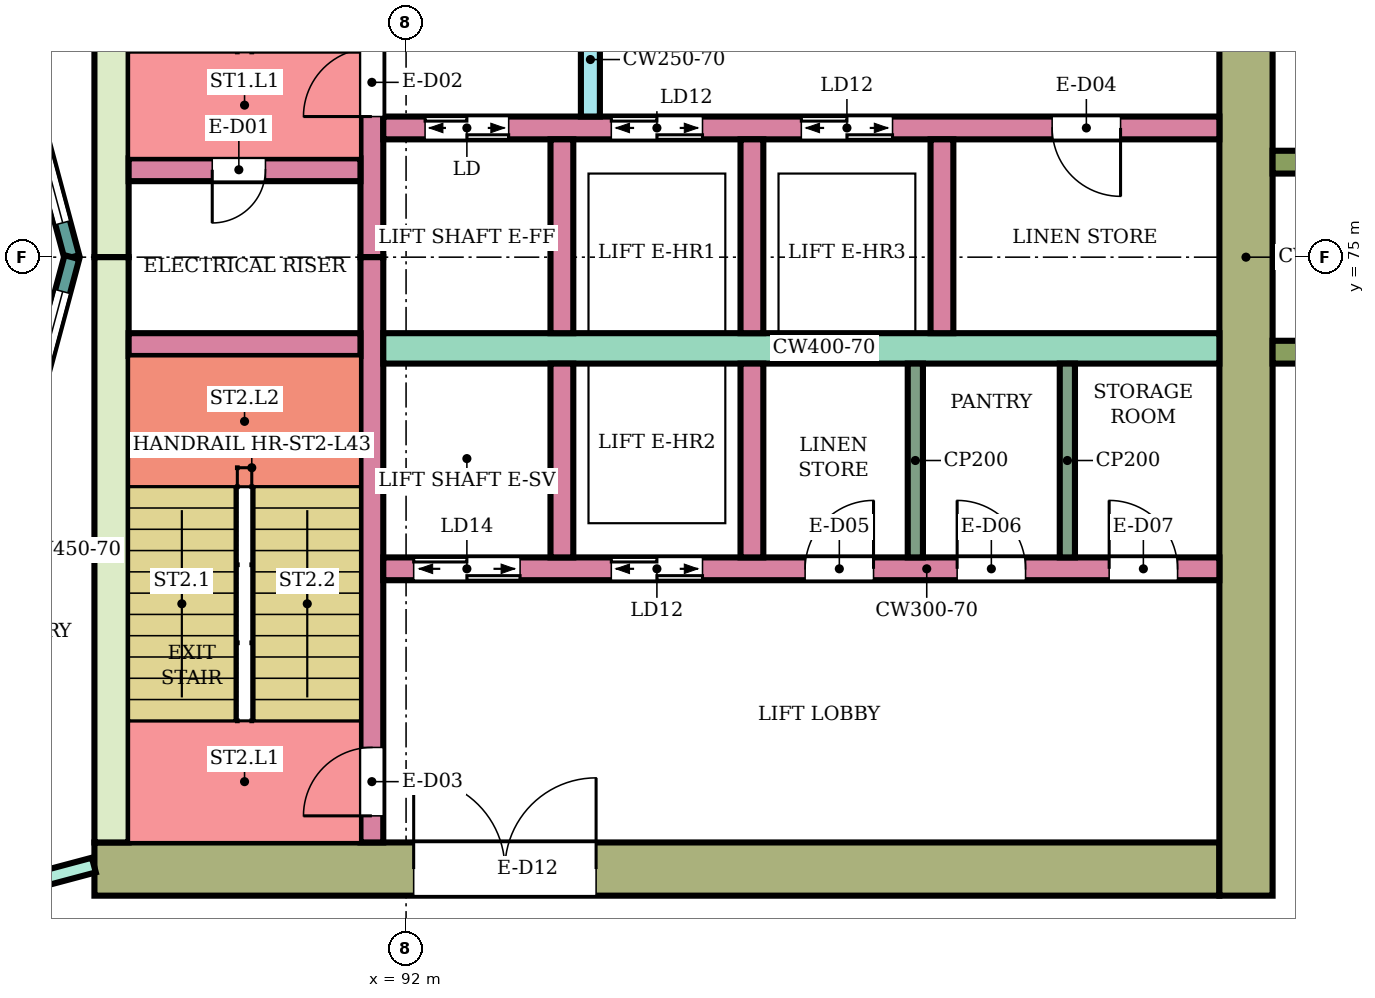
"""IFC4 building model, lengths in metres.
Left out: names, types, materials, properties, quantities, classifications, styles, units other than length and angle.
Written with IfcOpenShell. Run it as: python <this file> out.ifc"""

import sys

from ifc_helpers import new_model, si_unit, direction, frame, frame_2d, origin, place, context, subcontext, project, spatial, rectangle, extrude, element, fill, save


model = new_model("IFC4")
c1 = context("Model", 3, precision=1e-05, world=origin(), true_north=direction((0.0, 1.0)))
c2 = subcontext(c1, "Body", "Model", "MODEL_VIEW")
j1 = project(units=[si_unit("LENGTHUNIT", "METRE"), si_unit("PLANEANGLEUNIT", "RADIAN")], contexts=[c1])
p1 = place(None, origin())
s1 = spatial("IfcSite", under=j1, at=p1, CompositionType="ELEMENT")
p2 = place(p1, origin())
s2 = spatial("IfcBuilding", under=s1, at=p2, CompositionType="ELEMENT")
p3 = place(p2, frame((0.0, 0.0, 186.4)))
s3 = spatial("IfcBuildingStorey", under=s2, at=p3, CompositionType="ELEMENT", Elevation=186.4)
p4 = place(p3, frame((87.9, 66.95, 0.0), z_axis=(0.0, 0.0, 1.0), x_axis=(1.0, 0.0, 0.0)))
e1 = element("IfcWall", 1, at=p4, inside=s3, PredefinedType="SHEAR", context=c2, shape_type="SweptSolid", body=[
    extrude(rectangle(XDim=14.8, YDim=0.7, at=frame_2d((7.4, 0.0))), origin(), (0.0, 0.0, 1.0), 3.78),
])
p5 = place(p4, frame((4.2, 0.0, 0.0)))
e2 = element("IfcOpeningElement", 2, at=p5, cuts=e1, PredefinedType="OPENING", context=c2, shape_type="SweptSolid", body=[
    extrude(rectangle(XDim=2.4, YDim=2.4, at=frame_2d((1.2, 1.2))), frame((0.0, 0.36, 0.0), z_axis=(0.0, -1.0, 0.0), x_axis=(1.0, 0.0, 0.0)), (0.0, 0.0, 1.0), 0.72),
])
for number, where, z_axis, x_axis in (
    (3, (88.125, 75.0, 0.0), (0.0, 0.0, 1.0), (0.0, 1.0, 0.0)),
    (4, (88.125, 67.3, 0.0), (0.0, 0.0, 1.0), (0.0, 1.0, 0.0)),
):
    element("IfcWall", number, at=place(p3, frame(where, z_axis=z_axis, x_axis=x_axis)), inside=s3, PredefinedType="SHEAR", context=c2, shape_type="SweptSolid", body=[
        extrude(rectangle(XDim=7.7, YDim=0.45, at=frame_2d((3.85, 0.0))), origin(), (0.0, 0.0, 1.0), 3.78),
    ])
p6 = place(p3, frame((103.05, 66.6, 0.0), z_axis=(0.0, 0.0, 1.0), x_axis=(0.0, 1.0, 0.0)))
e5 = element("IfcWall", 5, at=p6, inside=s3, PredefinedType="SHEAR", context=c2, shape_type="SweptSolid", body=[
    extrude(rectangle(XDim=16.8, YDim=0.7, at=frame_2d((8.4, 0.0))), origin(), (0.0, 0.0, 1.0), 3.78),
])
p7 = place(p3, frame((91.55, 75.0, 0.0), z_axis=(0.0, 0.0, 1.0), x_axis=(0.0, 1.0, 0.0)))
e6 = element("IfcWall", 6, at=p7, inside=s3, PredefinedType="SHEAR", context=c2, shape_type="SweptSolid", body=[
    extrude(rectangle(XDim=7.7, YDim=0.3, at=frame_2d((3.85, 0.0))), origin(), (0.0, 0.0, 1.0), 3.78),
])
p8 = place(p7, frame((1.85, 0.0, 0.0)))
e7 = element("IfcOpeningElement", 7, at=p8, cuts=e6, PredefinedType="OPENING", context=c2, shape_type="SweptSolid", body=[
    extrude(rectangle(XDim=0.9, YDim=2.1, at=frame_2d((0.45, 1.05))), frame((0.0, 0.16, 0.0), z_axis=(0.0, -1.0, 0.0), x_axis=(1.0, 0.0, 0.0)), (0.0, 0.0, 1.0), 0.32),
])
p9 = place(p3, frame((91.55, 67.3, 0.0), z_axis=(0.0, 0.0, 1.0), x_axis=(0.0, 1.0, 0.0)))
e8 = element("IfcWall", 8, at=p9, inside=s3, PredefinedType="SHEAR", context=c2, shape_type="SweptSolid", body=[
    extrude(rectangle(XDim=7.7, YDim=0.3, at=frame_2d((3.85, 0.0))), origin(), (0.0, 0.0, 1.0), 3.78),
])
p10 = place(p9, frame((0.35, 0.0, 0.0)))
e9 = element("IfcOpeningElement", 9, at=p10, cuts=e8, PredefinedType="OPENING", context=c2, shape_type="SweptSolid", body=[
    extrude(rectangle(XDim=0.9, YDim=2.1, at=frame_2d((0.45, 1.05))), frame((0.0, 0.16, 0.0), z_axis=(0.0, -1.0, 0.0), x_axis=(1.0, 0.0, 0.0)), (0.0, 0.0, 1.0), 0.32),
])
p11 = place(p3, frame((88.35, 76.15, 0.0), z_axis=(0.0, 0.0, 1.0), x_axis=(1.0, 0.0, 0.0)))
e10 = element("IfcWall", 10, at=p11, inside=s3, PredefinedType="SHEAR", context=c2, shape_type="SweptSolid", body=[
    extrude(rectangle(XDim=3.05, YDim=0.3, at=frame_2d((1.525, 0.0))), origin(), (0.0, 0.0, 1.0), 3.78),
])
p12 = place(p11, frame((1.1, 0.0, 0.0)))
e11 = element("IfcOpeningElement", 11, at=p12, cuts=e10, PredefinedType="OPENING", context=c2, shape_type="SweptSolid", body=[
    extrude(rectangle(XDim=0.7, YDim=2.0, at=frame_2d((0.35, 1.0))), frame((0.0, 0.16, 0.0), z_axis=(0.0, -1.0, 0.0), x_axis=(1.0, 0.0, 0.0)), (0.0, 0.0, 1.0), 0.32),
])
p13 = place(p3, frame((88.35, 73.85, 0.0), z_axis=(0.0, 0.0, 1.0), x_axis=(1.0, 0.0, 0.0)))
e12 = element("IfcWall", 12, at=p13, inside=s3, PredefinedType="SHEAR", context=c2, shape_type="SweptSolid", body=[
    extrude(rectangle(XDim=3.05, YDim=0.3, at=frame_2d((1.525, 0.0))), origin(), (0.0, 0.0, 1.0), 3.78),
])
p14 = place(p3, frame((91.7, 76.7, 0.0), z_axis=(0.0, 0.0, 1.0), x_axis=(1.0, 0.0, 0.0)))
e13 = element("IfcWall", 13, at=p14, inside=s3, PredefinedType="SHEAR", context=c2, shape_type="SweptSolid", body=[
    extrude(rectangle(XDim=11.0, YDim=0.3, at=frame_2d((5.5, 0.0))), origin(), (0.0, 0.0, 1.0), 3.78),
])
p15 = place(p14, frame((0.55, 0.0, 0.0)))
e14 = element("IfcOpeningElement", 14, at=p15, cuts=e13, PredefinedType="OPENING", context=c2, shape_type="SweptSolid", body=[
    extrude(rectangle(XDim=1.1, YDim=2.1, at=frame_2d((0.55, 1.05))), frame((0.0, 0.16, 0.0), z_axis=(0.0, -1.0, 0.0), x_axis=(1.0, 0.0, 0.0)), (0.0, 0.0, 1.0), 0.32),
])
p16 = place(p14, frame((3.0, 0.0, 0.0)))
e15 = element("IfcOpeningElement", 15, at=p16, cuts=e13, PredefinedType="OPENING", context=c2, shape_type="SweptSolid", body=[
    extrude(rectangle(XDim=1.2, YDim=2.1, at=frame_2d((0.6, 1.05))), frame((0.0, 0.16, 0.0), z_axis=(0.0, -1.0, 0.0), x_axis=(1.0, 0.0, 0.0)), (0.0, 0.0, 1.0), 0.32),
])
p17 = place(p14, frame((5.5, 0.0, 0.0)))
e16 = element("IfcOpeningElement", 16, at=p17, cuts=e13, PredefinedType="OPENING", context=c2, shape_type="SweptSolid", body=[
    extrude(rectangle(XDim=1.2, YDim=2.1, at=frame_2d((0.6, 1.05))), frame((0.0, 0.16, 0.0), z_axis=(0.0, -1.0, 0.0), x_axis=(1.0, 0.0, 0.0)), (0.0, 0.0, 1.0), 0.32),
])
p18 = place(p14, frame((8.8, 0.0, 0.0)))
e17 = element("IfcOpeningElement", 17, at=p18, cuts=e13, PredefinedType="OPENING", context=c2, shape_type="SweptSolid", body=[
    extrude(rectangle(XDim=0.9, YDim=2.1, at=frame_2d((0.45, 1.05))), frame((0.0, 0.16, 0.0), z_axis=(0.0, -1.0, 0.0), x_axis=(1.0, 0.0, 0.0)), (0.0, 0.0, 1.0), 0.32),
])
p19 = place(p3, frame((91.7, 73.8, 0.0), z_axis=(0.0, 0.0, 1.0), x_axis=(1.0, 0.0, 0.0)))
e18 = element("IfcWall", 18, at=p19, inside=s3, PredefinedType="SHEAR", context=c2, shape_type="SweptSolid", body=[
    extrude(rectangle(XDim=11.0, YDim=0.4, at=frame_2d((5.5, 0.0))), origin(), (0.0, 0.0, 1.0), 3.78),
])
p20 = place(p3, frame((91.7, 70.9, 0.0), z_axis=(0.0, 0.0, 1.0), x_axis=(1.0, 0.0, 0.0)))
e19 = element("IfcWall", 19, at=p20, inside=s3, PredefinedType="SHEAR", context=c2, shape_type="SweptSolid", body=[
    extrude(rectangle(XDim=11.0, YDim=0.3, at=frame_2d((5.5, 0.0))), origin(), (0.0, 0.0, 1.0), 3.78),
])
p21 = place(p20, frame((0.4, 0.0, 0.0)))
e20 = element("IfcOpeningElement", 20, at=p21, cuts=e19, PredefinedType="OPENING", context=c2, shape_type="SweptSolid", body=[
    extrude(rectangle(XDim=1.4, YDim=2.1, at=frame_2d((0.7, 1.05))), frame((0.0, 0.16, 0.0), z_axis=(0.0, -1.0, 0.0), x_axis=(1.0, 0.0, 0.0)), (0.0, 0.0, 1.0), 0.32),
])
p22 = place(p20, frame((3.0, 0.0, 0.0)))
e21 = element("IfcOpeningElement", 21, at=p22, cuts=e19, PredefinedType="OPENING", context=c2, shape_type="SweptSolid", body=[
    extrude(rectangle(XDim=1.2, YDim=2.1, at=frame_2d((0.6, 1.05))), frame((0.0, 0.16, 0.0), z_axis=(0.0, -1.0, 0.0), x_axis=(1.0, 0.0, 0.0)), (0.0, 0.0, 1.0), 0.32),
])
p23 = place(p20, frame((5.55, 0.0, 0.0)))
e22 = element("IfcOpeningElement", 22, at=p23, cuts=e19, PredefinedType="OPENING", context=c2, shape_type="SweptSolid", body=[
    extrude(rectangle(XDim=0.9, YDim=2.1, at=frame_2d((0.45, 1.05))), frame((0.0, 0.16, 0.0), z_axis=(0.0, -1.0, 0.0), x_axis=(1.0, 0.0, 0.0)), (0.0, 0.0, 1.0), 0.32),
])
p24 = place(p20, frame((7.55, 0.0, 0.0)))
e23 = element("IfcOpeningElement", 23, at=p24, cuts=e19, PredefinedType="OPENING", context=c2, shape_type="SweptSolid", body=[
    extrude(rectangle(XDim=0.9, YDim=2.1, at=frame_2d((0.45, 1.05))), frame((0.0, 0.16, 0.0), z_axis=(0.0, -1.0, 0.0), x_axis=(1.0, 0.0, 0.0)), (0.0, 0.0, 1.0), 0.32),
])
p25 = place(p20, frame((9.55, 0.0, 0.0)))
e24 = element("IfcOpeningElement", 24, at=p25, cuts=e19, PredefinedType="OPENING", context=c2, shape_type="SweptSolid", body=[
    extrude(rectangle(XDim=0.9, YDim=2.1, at=frame_2d((0.45, 1.05))), frame((0.0, 0.16, 0.0), z_axis=(0.0, -1.0, 0.0), x_axis=(1.0, 0.0, 0.0)), (0.0, 0.0, 1.0), 0.32),
])
for number, where, z_axis, x_axis in (
    (25, (94.05, 74.0, 0.0), (0.0, 0.0, 1.0), (0.0, 1.0, 0.0)),
    (26, (96.55, 74.0, 0.0), (0.0, 0.0, 1.0), (0.0, 1.0, 0.0)),
    (27, (99.05, 74.0, 0.0), (0.0, 0.0, 1.0), (0.0, 1.0, 0.0)),
    (28, (94.05, 71.05, 0.0), (0.0, 0.0, 1.0), (0.0, 1.0, 0.0)),
    (29, (96.55, 71.05, 0.0), (0.0, 0.0, 1.0), (0.0, 1.0, 0.0)),
):
    element("IfcWall", number, at=place(p3, frame(where, z_axis=z_axis, x_axis=x_axis)), inside=s3, PredefinedType="SHEAR", context=c2, shape_type="SweptSolid", body=[
        extrude(rectangle(XDim=2.55, YDim=0.3, at=frame_2d((1.275, 0.0))), origin(), (0.0, 0.0, 1.0), 3.78),
    ])
p26 = place(p3, frame((94.425, 76.85, 0.0), z_axis=(0.0, 0.0, 1.0), x_axis=(0.0, 1.0, 0.0)))
e30 = element("IfcWall", 30, at=p26, inside=s3, PredefinedType="SHEAR", context=c2, shape_type="SweptSolid", body=[
    extrude(rectangle(XDim=1.5, YDim=0.25, at=frame_2d((0.75, 0.0))), origin(), (0.0, 0.0, 1.0), 3.78),
])
for number, where, z_axis, x_axis in (
    (31, (103.4, 73.75, 0.0), (0.0, 0.0, 1.0), (1.0, 0.0, 0.0)),
    (32, (103.4, 76.25, 0.0), (0.0, 0.0, 1.0), (1.0, 0.0, 0.0)),
):
    element("IfcWall", number, at=place(p3, frame(where, z_axis=z_axis, x_axis=x_axis)), inside=s3, PredefinedType="NOTDEFINED", context=c2, shape_type="SweptSolid", body=[
        extrude(rectangle(XDim=2.416, YDim=0.3, at=frame_2d((1.208, 0.0))), origin(), (0.0, 0.0, 1.0), 4.1),
    ])
p27 = place(p3, frame((87.604, 75.0, 0.0), z_axis=(0.0, 0.0, 1.0), x_axis=(-0.258789828301, 0.965933654434, 0.0)))
e33 = element("IfcWall", 33, at=p27, inside=s3, PredefinedType="NOTDEFINED", context=c2, shape_type="SweptSolid", body=[
    extrude(rectangle(XDim=3.936, YDim=0.2, at=frame_2d((1.968, 0.0))), origin(), (0.0, 0.0, 1.0), 4.1),
])
p28 = place(p27, frame((0.468, 0.0, 0.9)))
e34 = element("IfcOpeningElement", 34, at=p28, cuts=e33, PredefinedType="OPENING", context=c2, shape_type="SweptSolid", body=[
    extrude(rectangle(XDim=3.0, YDim=2.3, at=frame_2d((1.5, 1.15))), frame((0.0, 0.11, 0.0), z_axis=(0.0, -1.0, 0.0), x_axis=(1.0, 0.0, 0.0)), (0.0, 0.0, 1.0), 0.22),
])
p29 = place(p3, frame((86.585, 71.198, 0.0), z_axis=(0.0, 0.0, 1.0), x_axis=(0.258789828301, 0.965933654434, 0.0)))
e35 = element("IfcWall", 35, at=p29, inside=s3, PredefinedType="NOTDEFINED", context=c2, shape_type="SweptSolid", body=[
    extrude(rectangle(XDim=3.936, YDim=0.2, at=frame_2d((1.968, 0.0))), origin(), (0.0, 0.0, 1.0), 4.1),
])
p30 = place(p29, frame((0.468, 0.0, 0.9)))
e36 = element("IfcOpeningElement", 36, at=p30, cuts=e35, PredefinedType="OPENING", context=c2, shape_type="SweptSolid", body=[
    extrude(rectangle(XDim=3.0, YDim=2.3, at=frame_2d((1.5, 1.15))), frame((0.0, 0.11, 0.0), z_axis=(0.0, -1.0, 0.0), x_axis=(1.0, 0.0, 0.0)), (0.0, 0.0, 1.0), 0.22),
])
p31 = place(p3, frame((80.125, 64.932, 0.0), z_axis=(0.0, 0.0, 1.0), x_axis=(0.966236955806, 0.257655089674, 0.0)))
e37 = element("IfcWall", 37, at=p31, inside=s3, PredefinedType="PARTITIONING", context=c2, shape_type="SweptSolid", body=[
    extrude(rectangle(XDim=8.039, YDim=0.2, at=frame_2d((4.02, 0.0))), origin(), (0.0, 0.0, 1.0), 3.65),
])
p32 = place(p31, frame((6.298, 0.0, 0.0)))
e38 = element("IfcOpeningElement", 38, at=p32, cuts=e37, PredefinedType="OPENING", context=c2, shape_type="SweptSolid", body=[
    extrude(rectangle(XDim=0.9, YDim=2.1, at=frame_2d((0.45, 1.05))), frame((0.0, 0.11, 0.0), z_axis=(0.0, -1.0, 0.0), x_axis=(1.0, 0.0, 0.0)), (0.0, 0.0, 1.0), 0.22),
])
p33 = place(p31, frame((2.045, 0.0, 0.0)))
e39 = element("IfcOpeningElement", 39, at=p33, cuts=e37, PredefinedType="OPENING", context=c2, shape_type="SweptSolid", body=[
    extrude(rectangle(XDim=0.9, YDim=2.1, at=frame_2d((0.45, 1.05))), frame((0.0, 0.11, 0.0), z_axis=(0.0, -1.0, 0.0), x_axis=(1.0, 0.0, 0.0)), (0.0, 0.0, 1.0), 0.22),
])
for number, where, z_axis, x_axis in (
    (40, (98.7, 71.05, 0.0), (0.0, 0.0, 1.0), (0.0, 1.0, 0.0)),
    (41, (100.7, 71.05, 0.0), (0.0, 0.0, 1.0), (0.0, 1.0, 0.0)),
):
    element("IfcWall", number, at=place(p3, frame(where, z_axis=z_axis, x_axis=x_axis)), inside=s3, PredefinedType="PARTITIONING", context=c2, shape_type="SweptSolid", body=[
        extrude(rectangle(XDim=2.55, YDim=0.2, at=frame_2d((1.275, 0.0))), origin(), (0.0, 0.0, 1.0), 3.78),
    ])
p34 = place(p28, origin())
e42 = element("IfcWindow", 42, at=p34, inside=s3, PartitioningType="SINGLE_PANEL", PredefinedType="WINDOW", context=c2, shape_type="SweptSolid", body=[
    extrude(rectangle(XDim=3.0, YDim=2.3, at=frame_2d((1.5, 1.15))), frame((0.0, 0.03, 0.0), z_axis=(0.0, -1.0, 0.0), x_axis=(1.0, 0.0, 0.0)), (0.0, 0.0, 1.0), 0.06),
])
fill(e34, e42)
p35 = place(p30, origin())
e43 = element("IfcWindow", 43, at=p35, inside=s3, PartitioningType="SINGLE_PANEL", PredefinedType="WINDOW", context=c2, shape_type="SweptSolid", body=[
    extrude(rectangle(XDim=3.0, YDim=2.3, at=frame_2d((1.5, 1.15))), frame((0.0, 0.03, 0.0), z_axis=(0.0, -1.0, 0.0), x_axis=(1.0, 0.0, 0.0)), (0.0, 0.0, 1.0), 0.06),
])
fill(e36, e43)
p36 = place(p12, frame((0.7, 0.0, 0.0), z_axis=(0.0, 0.0, 1.0), x_axis=(-1.0, 0.0, 0.0)))
e44 = element("IfcDoor", 44, at=p36, inside=s3, OperationType="SINGLE_SWING_RIGHT", PredefinedType="DOOR", context=c2, shape_type="SweptSolid", body=[
    extrude(rectangle(XDim=0.7, YDim=2.0, at=frame_2d((0.35, 1.0))), frame((0.0, 0.025, 0.0), z_axis=(0.0, -1.0, 0.0), x_axis=(1.0, 0.0, 0.0)), (0.0, 0.0, 1.0), 0.05),
])
fill(e11, e44)
p37 = place(p8, origin())
e45 = element("IfcDoor", 45, at=p37, inside=s3, OperationType="SINGLE_SWING_LEFT", PredefinedType="DOOR", context=c2, shape_type="SweptSolid", body=[
    extrude(rectangle(XDim=0.9, YDim=2.1, at=frame_2d((0.45, 1.05))), frame((0.0, 0.025, 0.0), z_axis=(0.0, -1.0, 0.0), x_axis=(1.0, 0.0, 0.0)), (0.0, 0.0, 1.0), 0.05),
])
fill(e7, e45)
p38 = place(p10, origin())
e46 = element("IfcDoor", 46, at=p38, inside=s3, OperationType="SINGLE_SWING_LEFT", PredefinedType="DOOR", context=c2, shape_type="SweptSolid", body=[
    extrude(rectangle(XDim=0.9, YDim=2.1, at=frame_2d((0.45, 1.05))), frame((0.0, 0.025, 0.0), z_axis=(0.0, -1.0, 0.0), x_axis=(1.0, 0.0, 0.0)), (0.0, 0.0, 1.0), 0.05),
])
fill(e9, e46)
p39 = place(p15, origin())
e47 = element("IfcDoor", 47, at=p39, inside=s3, OperationType="DOUBLE_DOOR_SLIDING", PredefinedType="DOOR", context=c2, shape_type="SweptSolid", body=[
    extrude(rectangle(XDim=1.1, YDim=2.1, at=frame_2d((0.55, 1.05))), frame((0.0, 0.025, 0.0), z_axis=(0.0, -1.0, 0.0), x_axis=(1.0, 0.0, 0.0)), (0.0, 0.0, 1.0), 0.05),
])
fill(e14, e47)
p40 = place(p16, origin())
e48 = element("IfcDoor", 48, at=p40, inside=s3, OperationType="DOUBLE_DOOR_SLIDING", PredefinedType="DOOR", context=c2, shape_type="SweptSolid", body=[
    extrude(rectangle(XDim=1.2, YDim=2.1, at=frame_2d((0.6, 1.05))), frame((0.0, 0.025, 0.0), z_axis=(0.0, -1.0, 0.0), x_axis=(1.0, 0.0, 0.0)), (0.0, 0.0, 1.0), 0.05),
])
fill(e15, e48)
p41 = place(p17, origin())
e49 = element("IfcDoor", 49, at=p41, inside=s3, OperationType="DOUBLE_DOOR_SLIDING", PredefinedType="DOOR", context=c2, shape_type="SweptSolid", body=[
    extrude(rectangle(XDim=1.2, YDim=2.1, at=frame_2d((0.6, 1.05))), frame((0.0, 0.025, 0.0), z_axis=(0.0, -1.0, 0.0), x_axis=(1.0, 0.0, 0.0)), (0.0, 0.0, 1.0), 0.05),
])
fill(e16, e49)
p42 = place(p18, frame((0.9, 0.0, 0.0), z_axis=(0.0, 0.0, 1.0), x_axis=(-1.0, 0.0, 0.0)))
e50 = element("IfcDoor", 50, at=p42, inside=s3, OperationType="SINGLE_SWING_LEFT", PredefinedType="DOOR", context=c2, shape_type="SweptSolid", body=[
    extrude(rectangle(XDim=0.9, YDim=2.1, at=frame_2d((0.45, 1.05))), frame((0.0, 0.025, 0.0), z_axis=(0.0, -1.0, 0.0), x_axis=(1.0, 0.0, 0.0)), (0.0, 0.0, 1.0), 0.05),
])
fill(e17, e50)
p43 = place(p21, origin())
e51 = element("IfcDoor", 51, at=p43, inside=s3, OperationType="DOUBLE_DOOR_SLIDING", PredefinedType="DOOR", context=c2, shape_type="SweptSolid", body=[
    extrude(rectangle(XDim=1.4, YDim=2.1, at=frame_2d((0.7, 1.05))), frame((0.0, 0.025, 0.0), z_axis=(0.0, -1.0, 0.0), x_axis=(1.0, 0.0, 0.0)), (0.0, 0.0, 1.0), 0.05),
])
fill(e20, e51)
p44 = place(p22, origin())
e52 = element("IfcDoor", 52, at=p44, inside=s3, OperationType="DOUBLE_DOOR_SLIDING", PredefinedType="DOOR", context=c2, shape_type="SweptSolid", body=[
    extrude(rectangle(XDim=1.2, YDim=2.1, at=frame_2d((0.6, 1.05))), frame((0.0, 0.025, 0.0), z_axis=(0.0, -1.0, 0.0), x_axis=(1.0, 0.0, 0.0)), (0.0, 0.0, 1.0), 0.05),
])
fill(e21, e52)
p45 = place(p23, origin())
e53 = element("IfcDoor", 53, at=p45, inside=s3, OperationType="SINGLE_SWING_RIGHT", PredefinedType="DOOR", context=c2, shape_type="SweptSolid", body=[
    extrude(rectangle(XDim=0.9, YDim=2.1, at=frame_2d((0.45, 1.05))), frame((0.0, 0.025, 0.0), z_axis=(0.0, -1.0, 0.0), x_axis=(1.0, 0.0, 0.0)), (0.0, 0.0, 1.0), 0.05),
])
fill(e22, e53)
p46 = place(p24, origin())
e54 = element("IfcDoor", 54, at=p46, inside=s3, OperationType="SINGLE_SWING_LEFT", PredefinedType="DOOR", context=c2, shape_type="SweptSolid", body=[
    extrude(rectangle(XDim=0.9, YDim=2.1, at=frame_2d((0.45, 1.05))), frame((0.0, 0.025, 0.0), z_axis=(0.0, -1.0, 0.0), x_axis=(1.0, 0.0, 0.0)), (0.0, 0.0, 1.0), 0.05),
])
fill(e23, e54)
p47 = place(p25, origin())
e55 = element("IfcDoor", 55, at=p47, inside=s3, OperationType="SINGLE_SWING_LEFT", PredefinedType="DOOR", context=c2, shape_type="SweptSolid", body=[
    extrude(rectangle(XDim=0.9, YDim=2.1, at=frame_2d((0.45, 1.05))), frame((0.0, 0.025, 0.0), z_axis=(0.0, -1.0, 0.0), x_axis=(1.0, 0.0, 0.0)), (0.0, 0.0, 1.0), 0.05),
])
fill(e24, e55)
p48 = place(p5, origin())
e56 = element("IfcDoor", 56, at=p48, inside=s3, OperationType="DOUBLE_DOOR_SINGLE_SWING", PredefinedType="DOOR", context=c2, shape_type="SweptSolid", body=[
    extrude(rectangle(XDim=2.4, YDim=2.4, at=frame_2d((1.2, 1.2))), frame((0.0, 0.025, 0.0), z_axis=(0.0, -1.0, 0.0), x_axis=(1.0, 0.0, 0.0)), (0.0, 0.0, 1.0), 0.05),
])
fill(e2, e56)
save(model, sys.argv[1])
